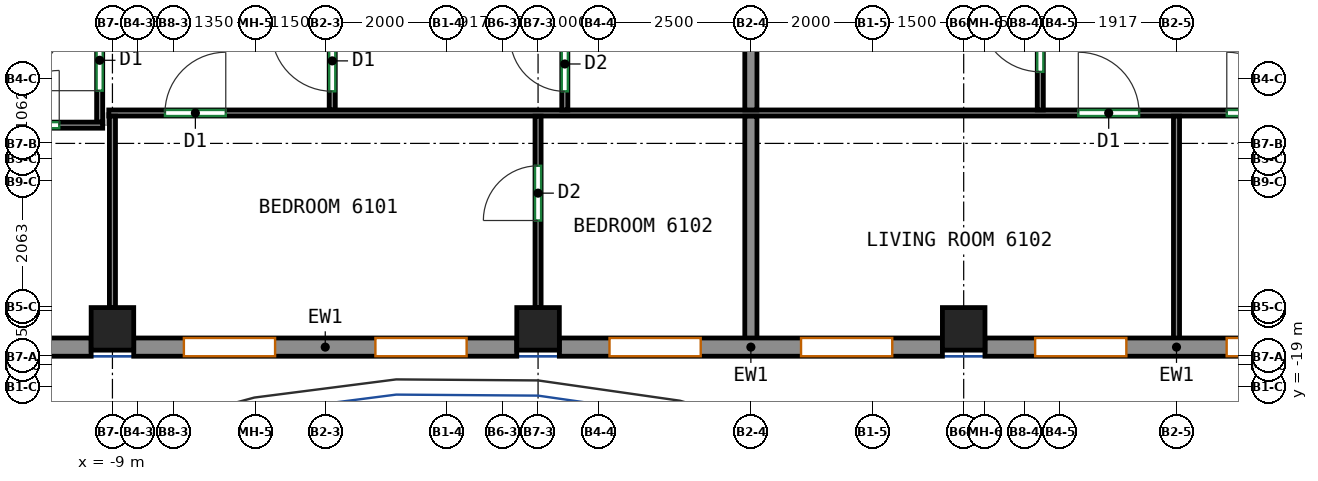
"""IFC4 building model, lengths in metres.
Left out: names, types, materials, properties, quantities, classifications, styles, units other than length and angle.
Written with IfcOpenShell. Run it as: python <this file> out.ifc"""

import sys

from ifc_helpers import new_model, si_unit, direction, frame, frame_2d, origin, origin_2d, place, context, subcontext, project, spatial, rectangle, extrude, source, transform, mapped, element, fill, save


model = new_model("IFC4")
c1 = context("Model", 3, precision=1e-05, world=origin(), true_north=direction((0.0, 1.0)))
c2 = subcontext(c1, "Body", "Model", "MODEL_VIEW")
j1 = project(units=[si_unit("LENGTHUNIT", "METRE"), si_unit("PLANEANGLEUNIT", "RADIAN")], contexts=[c1])
p1 = place(None, origin())
s1 = spatial("IfcSite", under=j1, at=p1, CompositionType="ELEMENT")
p2 = place(p1, origin())
s2 = spatial("IfcBuilding", under=s1, at=p2, CompositionType="ELEMENT")
p3 = place(p2, frame((0.0, 0.0, 252.6)))
s3 = spatial("IfcBuildingStorey", under=s2, at=p3, CompositionType="ELEMENT", Elevation=252.6)
m1 = source(origin(), c2, "Body", "SweptSolid", [
    extrude(rectangle(XDim=0.7, YDim=0.7, at=origin_2d()), origin(), (0.0, 0.0, 1.0), 3.12),
])
for number, where, z_axis, x_axis in (
    (1, (-9.0, -18.05, 0.0), (0.0, 0.0, 1.0), (1.0, 0.0, 0.0)),
    (2, (-2.0, -18.05, 0.0), (0.0, 0.0, 1.0), (1.0, 0.0, 0.0)),
    (3, (5.0, -18.05, 0.0), (0.0, 0.0, 1.0), (1.0, 0.0, 0.0)),
):
    element("IfcColumn", number, at=place(p3, frame(where, z_axis=z_axis, x_axis=x_axis)), inside=s3, PredefinedType="COLUMN", context=c2, shape_type="MappedRepresentation", body=[
        mapped(m1, transform((0.0, 0.0, 0.0))),
    ])
m2 = source(origin(), c2, "Body", "SweptSolid", [
    extrude(rectangle(XDim=6.3, YDim=0.3, at=frame_2d((3.15, 0.0))), origin(), (0.0, 0.0, 1.0), 3.12),
])
p4 = place(p3, frame((-15.65, -18.35, 0.0), z_axis=(0.0, 0.0, 1.0), x_axis=(1.0, 0.0, 0.0)))
e4 = element("IfcWall", 4, at=p4, inside=s3, PredefinedType="SOLIDWALL", context=c2, shape_type="MappedRepresentation", body=[
    mapped(m2, transform((0.0, 0.0, 0.0))),
])
p5 = place(p4, frame((0.825, 0.0, 0.8)))
e5 = element("IfcOpeningElement", 5, at=p5, cuts=e4, PredefinedType="OPENING", context=c2, shape_type="SweptSolid", body=[
    extrude(rectangle(XDim=1.5, YDim=2.05, at=frame_2d((0.75, 1.025))), frame((0.0, 0.16, 0.0), z_axis=(0.0, -1.0, 0.0), x_axis=(1.0, 0.0, 0.0)), (0.0, 0.0, 1.0), 0.32),
])
p6 = place(p4, frame((3.975, 0.0, 0.8)))
e6 = element("IfcOpeningElement", 6, at=p6, cuts=e4, PredefinedType="OPENING", context=c2, shape_type="SweptSolid", body=[
    extrude(rectangle(XDim=1.5, YDim=2.05, at=frame_2d((0.75, 1.025))), frame((0.0, 0.16, 0.0), z_axis=(0.0, -1.0, 0.0), x_axis=(1.0, 0.0, 0.0)), (0.0, 0.0, 1.0), 0.32),
])
p7 = place(p3, frame((-8.65, -18.35, 0.0), z_axis=(0.0, 0.0, 1.0), x_axis=(1.0, 0.0, 0.0)))
e7 = element("IfcWall", 7, at=p7, inside=s3, PredefinedType="SOLIDWALL", context=c2, shape_type="MappedRepresentation", body=[
    mapped(m2, transform((0.0, 0.0, 0.0))),
])
p8 = place(p7, frame((0.825, 0.0, 0.8)))
e8 = element("IfcOpeningElement", 8, at=p8, cuts=e7, PredefinedType="OPENING", context=c2, shape_type="SweptSolid", body=[
    extrude(rectangle(XDim=1.5, YDim=2.05, at=frame_2d((0.75, 1.025))), frame((0.0, 0.16, 0.0), z_axis=(0.0, -1.0, 0.0), x_axis=(1.0, 0.0, 0.0)), (0.0, 0.0, 1.0), 0.32),
])
p9 = place(p7, frame((3.975, 0.0, 0.8)))
e9 = element("IfcOpeningElement", 9, at=p9, cuts=e7, PredefinedType="OPENING", context=c2, shape_type="SweptSolid", body=[
    extrude(rectangle(XDim=1.5, YDim=2.05, at=frame_2d((0.75, 1.025))), frame((0.0, 0.16, 0.0), z_axis=(0.0, -1.0, 0.0), x_axis=(1.0, 0.0, 0.0)), (0.0, 0.0, 1.0), 0.32),
])
p10 = place(p3, frame((-1.65, -18.35, 0.0), z_axis=(0.0, 0.0, 1.0), x_axis=(1.0, 0.0, 0.0)))
e10 = element("IfcWall", 10, at=p10, inside=s3, PredefinedType="SOLIDWALL", context=c2, shape_type="MappedRepresentation", body=[
    mapped(m2, transform((0.0, 0.0, 0.0))),
])
p11 = place(p10, frame((0.825, 0.0, 0.8)))
e11 = element("IfcOpeningElement", 11, at=p11, cuts=e10, PredefinedType="OPENING", context=c2, shape_type="SweptSolid", body=[
    extrude(rectangle(XDim=1.5, YDim=2.05, at=frame_2d((0.75, 1.025))), frame((0.0, 0.16, 0.0), z_axis=(0.0, -1.0, 0.0), x_axis=(1.0, 0.0, 0.0)), (0.0, 0.0, 1.0), 0.32),
])
p12 = place(p10, frame((3.975, 0.0, 0.8)))
e12 = element("IfcOpeningElement", 12, at=p12, cuts=e10, PredefinedType="OPENING", context=c2, shape_type="SweptSolid", body=[
    extrude(rectangle(XDim=1.5, YDim=2.05, at=frame_2d((0.75, 1.025))), frame((0.0, 0.16, 0.0), z_axis=(0.0, -1.0, 0.0), x_axis=(1.0, 0.0, 0.0)), (0.0, 0.0, 1.0), 0.32),
])
p13 = place(p3, frame((5.35, -18.35, 0.0), z_axis=(0.0, 0.0, 1.0), x_axis=(1.0, 0.0, 0.0)))
e13 = element("IfcWall", 13, at=p13, inside=s3, PredefinedType="SOLIDWALL", context=c2, shape_type="MappedRepresentation", body=[
    mapped(m2, transform((0.0, 0.0, 0.0))),
])
p14 = place(p13, frame((0.825, 0.0, 0.8)))
e14 = element("IfcOpeningElement", 14, at=p14, cuts=e13, PredefinedType="OPENING", context=c2, shape_type="SweptSolid", body=[
    extrude(rectangle(XDim=1.5, YDim=2.05, at=frame_2d((0.75, 1.025))), frame((0.0, 0.16, 0.0), z_axis=(0.0, -1.0, 0.0), x_axis=(1.0, 0.0, 0.0)), (0.0, 0.0, 1.0), 0.32),
])
p15 = place(p13, frame((3.975, 0.0, 0.8)))
e15 = element("IfcOpeningElement", 15, at=p15, cuts=e13, PredefinedType="OPENING", context=c2, shape_type="SweptSolid", body=[
    extrude(rectangle(XDim=1.5, YDim=2.05, at=frame_2d((0.75, 1.025))), frame((0.0, 0.16, 0.0), z_axis=(0.0, -1.0, 0.0), x_axis=(1.0, 0.0, 0.0)), (0.0, 0.0, 1.0), 0.32),
])
p16 = place(p3, frame((-9.21, -14.65, 0.0), z_axis=(0.0, 0.0, 1.0), x_axis=(0.0, 1.0, 0.0)))
e16 = element("IfcWall", 16, at=p16, inside=s3, PredefinedType="PARTITIONING", context=c2, shape_type="SweptSolid", body=[
    extrude(rectangle(XDim=2.773, YDim=0.1, at=frame_2d((1.386, 0.0))), origin(), (0.0, 0.0, 1.0), 3.12),
])
p17 = place(p16, frame((0.517, 0.0, 0.0)))
e17 = element("IfcOpeningElement", 17, at=p17, cuts=e16, PredefinedType="OPENING", context=c2, shape_type="SweptSolid", body=[
    extrude(rectangle(XDim=1.0, YDim=2.1, at=frame_2d((0.5, 1.05))), frame((0.0, 0.06, 0.0), z_axis=(0.0, -1.0, 0.0), x_axis=(1.0, 0.0, 0.0)), (0.0, 0.0, 1.0), 0.12),
])
p18 = place(p3, frame((-13.55, -14.7, 0.0), z_axis=(0.0, 0.0, 1.0), x_axis=(1.0, 0.0, 0.0)))
e18 = element("IfcWall", 18, at=p18, inside=s3, PredefinedType="PARTITIONING", context=c2, shape_type="SweptSolid", body=[
    extrude(rectangle(XDim=4.39, YDim=0.1, at=frame_2d((2.195, 0.0))), origin(), (0.0, 0.0, 1.0), 3.12),
])
p19 = place(p18, frame((2.775, 0.0, 0.0)))
e19 = element("IfcOpeningElement", 19, at=p19, cuts=e18, PredefinedType="OPENING", context=c2, shape_type="SweptSolid", body=[
    extrude(rectangle(XDim=0.9, YDim=2.1, at=frame_2d((0.45, 1.05))), frame((0.0, 0.06, 0.0), z_axis=(0.0, -1.0, 0.0), x_axis=(1.0, 0.0, 0.0)), (0.0, 0.0, 1.0), 0.12),
])
p20 = place(p3, frame((-5.385, -14.45, 0.0), z_axis=(0.0, 0.0, 1.0), x_axis=(0.0, 1.0, 0.0)))
e20 = element("IfcWall", 20, at=p20, inside=s3, PredefinedType="PARTITIONING", context=c2, shape_type="SweptSolid", body=[
    extrude(rectangle(XDim=2.573, YDim=0.1, at=frame_2d((1.287, 0.0))), origin(), (0.0, 0.0, 1.0), 3.12),
])
p21 = place(p20, frame((0.307, 0.0, 0.0)))
e21 = element("IfcOpeningElement", 21, at=p21, cuts=e20, PredefinedType="OPENING", context=c2, shape_type="SweptSolid", body=[
    extrude(rectangle(XDim=1.0, YDim=2.1, at=frame_2d((0.5, 1.05))), frame((0.0, 0.06, 0.0), z_axis=(0.0, -1.0, 0.0), x_axis=(1.0, 0.0, 0.0)), (0.0, 0.0, 1.0), 0.12),
])
p22 = place(p3, frame((-9.06, -14.5, 0.0), z_axis=(0.0, 0.0, 1.0), x_axis=(1.0, 0.0, 0.0)))
e22 = element("IfcWall", 22, at=p22, inside=s3, PredefinedType="PARTITIONING", context=c2, shape_type="SweptSolid", body=[
    extrude(rectangle(XDim=24.66, YDim=0.1, at=frame_2d((12.33, 0.0))), origin(), (0.0, 0.0, 1.0), 3.12),
])
p23 = place(p22, frame((0.924, 0.0, 0.0)))
e23 = element("IfcOpeningElement", 23, at=p23, cuts=e22, PredefinedType="OPENING", context=c2, shape_type="SweptSolid", body=[
    extrude(rectangle(XDim=1.0, YDim=2.1, at=frame_2d((0.5, 1.05))), frame((0.0, 0.06, 0.0), z_axis=(0.0, -1.0, 0.0), x_axis=(1.0, 0.0, 0.0)), (0.0, 0.0, 1.0), 0.12),
])
p24 = place(p22, frame((15.945, 0.0, 0.0)))
e24 = element("IfcOpeningElement", 24, at=p24, cuts=e22, PredefinedType="OPENING", context=c2, shape_type="SweptSolid", body=[
    extrude(rectangle(XDim=1.0, YDim=2.1, at=frame_2d((0.5, 1.05))), frame((0.0, 0.06, 0.0), z_axis=(0.0, -1.0, 0.0), x_axis=(1.0, 0.0, 0.0)), (0.0, 0.0, 1.0), 0.12),
])
p25 = place(p22, frame((18.387, 0.0, 0.0)))
e25 = element("IfcOpeningElement", 25, at=p25, cuts=e22, PredefinedType="OPENING", context=c2, shape_type="SweptSolid", body=[
    extrude(rectangle(XDim=1.0, YDim=2.1, at=frame_2d((0.5, 1.05))), frame((0.0, 0.06, 0.0), z_axis=(0.0, -1.0, 0.0), x_axis=(1.0, 0.0, 0.0)), (0.0, 0.0, 1.0), 0.12),
])
p26 = place(p3, frame((-1.56, -14.45, 0.0), z_axis=(0.0, 0.0, 1.0), x_axis=(0.0, 1.0, 0.0)))
e26 = element("IfcWall", 26, at=p26, inside=s3, PredefinedType="PARTITIONING", context=c2, shape_type="SweptSolid", body=[
    extrude(rectangle(XDim=2.573, YDim=0.1, at=frame_2d((1.287, 0.0))), origin(), (0.0, 0.0, 1.0), 3.12),
])
p27 = place(p26, frame((0.306, 0.0, 0.0)))
e27 = element("IfcOpeningElement", 27, at=p27, cuts=e26, PredefinedType="OPENING", context=c2, shape_type="SweptSolid", body=[
    extrude(rectangle(XDim=0.9, YDim=2.1, at=frame_2d((0.45, 1.05))), frame((0.0, 0.06, 0.0), z_axis=(0.0, -1.0, 0.0), x_axis=(1.0, 0.0, 0.0)), (0.0, 0.0, 1.0), 0.12),
])
p28 = place(p3, frame((1.5, -14.45, 0.0), z_axis=(0.0, 0.0, 1.0), x_axis=(0.0, 1.0, 0.0)))
e28 = element("IfcWall", 28, at=p28, inside=s3, PredefinedType="PARTITIONING", context=c2, shape_type="SweptSolid", body=[
    extrude(rectangle(XDim=2.573, YDim=0.2, at=frame_2d((1.287, 0.0))), origin(), (0.0, 0.0, 1.0), 3.12),
])
p29 = place(p3, frame((-9.0, -17.7, 0.0), z_axis=(0.0, 0.0, 1.0), x_axis=(0.0, 1.0, 0.0)))
e29 = element("IfcWall", 29, at=p29, inside=s3, PredefinedType="PARTITIONING", context=c2, shape_type="SweptSolid", body=[
    extrude(rectangle(XDim=3.148, YDim=0.1, at=frame_2d((1.574, 0.0))), origin(), (0.0, 0.0, 1.0), 3.12),
])
p30 = place(p3, frame((-2.0, -17.7, 0.0), z_axis=(0.0, 0.0, 1.0), x_axis=(0.0, 1.0, 0.0)))
e30 = element("IfcWall", 30, at=p30, inside=s3, PredefinedType="PARTITIONING", context=c2, shape_type="SweptSolid", body=[
    extrude(rectangle(XDim=3.148, YDim=0.1, at=frame_2d((1.574, 0.0))), origin(), (0.0, 0.0, 1.0), 3.12),
])
p31 = place(p30, frame((1.432, 0.0, 0.0)))
e31 = element("IfcOpeningElement", 31, at=p31, cuts=e30, PredefinedType="OPENING", context=c2, shape_type="SweptSolid", body=[
    extrude(rectangle(XDim=0.9, YDim=2.1, at=frame_2d((0.45, 1.05))), frame((0.0, 0.06, 0.0), z_axis=(0.0, -1.0, 0.0), x_axis=(1.0, 0.0, 0.0)), (0.0, 0.0, 1.0), 0.12),
])
p32 = place(p3, frame((1.5, -18.25, 0.0), z_axis=(0.0, 0.0, 1.0), x_axis=(0.0, 1.0, 0.0)))
e32 = element("IfcWall", 32, at=p32, inside=s3, PredefinedType="PARTITIONING", context=c2, shape_type="SweptSolid", body=[
    extrude(rectangle(XDim=3.698, YDim=0.2, at=frame_2d((1.849, 0.0))), origin(), (0.0, 0.0, 1.0), 3.12),
])
p33 = place(p3, frame((6.26, -14.45, 0.0), z_axis=(0.0, 0.0, 1.0), x_axis=(0.0, 1.0, 0.0)))
e33 = element("IfcWall", 33, at=p33, inside=s3, PredefinedType="PARTITIONING", context=c2, shape_type="SweptSolid", body=[
    extrude(rectangle(XDim=2.573, YDim=0.1, at=frame_2d((1.287, 0.0))), origin(), (0.0, 0.0, 1.0), 3.12),
])
p34 = place(p33, frame((0.627, 0.0, 0.0)))
e34 = element("IfcOpeningElement", 34, at=p34, cuts=e33, PredefinedType="OPENING", context=c2, shape_type="SweptSolid", body=[
    extrude(rectangle(XDim=1.0, YDim=2.1, at=frame_2d((0.5, 1.05))), frame((0.0, 0.06, 0.0), z_axis=(0.0, -1.0, 0.0), x_axis=(1.0, 0.0, 0.0)), (0.0, 0.0, 1.0), 0.12),
])
p35 = place(p3, frame((8.5, -18.25, 0.0), z_axis=(0.0, 0.0, 1.0), x_axis=(0.0, 1.0, 0.0)))
e35 = element("IfcWall", 35, at=p35, inside=s3, PredefinedType="PARTITIONING", context=c2, shape_type="SweptSolid", body=[
    extrude(rectangle(XDim=3.698, YDim=0.1, at=frame_2d((1.849, 0.0))), origin(), (0.0, 0.0, 1.0), 3.12),
])
p36 = place(p8, origin())
e36 = element("IfcWindow", 36, at=p36, inside=s3, PartitioningType="SINGLE_PANEL", PredefinedType="WINDOW", context=c2, shape_type="SweptSolid", body=[
    extrude(rectangle(XDim=1.5, YDim=2.05, at=frame_2d((0.75, 1.025))), frame((0.0, 0.03, 0.0), z_axis=(0.0, -1.0, 0.0), x_axis=(1.0, 0.0, 0.0)), (0.0, 0.0, 1.0), 0.06),
])
fill(e8, e36)
p37 = place(p9, origin())
e37 = element("IfcWindow", 37, at=p37, inside=s3, PartitioningType="SINGLE_PANEL", PredefinedType="WINDOW", context=c2, shape_type="SweptSolid", body=[
    extrude(rectangle(XDim=1.5, YDim=2.05, at=frame_2d((0.75, 1.025))), frame((0.0, 0.03, 0.0), z_axis=(0.0, -1.0, 0.0), x_axis=(1.0, 0.0, 0.0)), (0.0, 0.0, 1.0), 0.06),
])
fill(e9, e37)
p38 = place(p11, origin())
e38 = element("IfcWindow", 38, at=p38, inside=s3, PartitioningType="SINGLE_PANEL", PredefinedType="WINDOW", context=c2, shape_type="SweptSolid", body=[
    extrude(rectangle(XDim=1.5, YDim=2.05, at=frame_2d((0.75, 1.025))), frame((0.0, 0.03, 0.0), z_axis=(0.0, -1.0, 0.0), x_axis=(1.0, 0.0, 0.0)), (0.0, 0.0, 1.0), 0.06),
])
fill(e11, e38)
p39 = place(p12, origin())
e39 = element("IfcWindow", 39, at=p39, inside=s3, PartitioningType="SINGLE_PANEL", PredefinedType="WINDOW", context=c2, shape_type="SweptSolid", body=[
    extrude(rectangle(XDim=1.5, YDim=2.05, at=frame_2d((0.75, 1.025))), frame((0.0, 0.03, 0.0), z_axis=(0.0, -1.0, 0.0), x_axis=(1.0, 0.0, 0.0)), (0.0, 0.0, 1.0), 0.06),
])
fill(e12, e39)
p40 = place(p14, origin())
e40 = element("IfcWindow", 40, at=p40, inside=s3, PartitioningType="SINGLE_PANEL", PredefinedType="WINDOW", context=c2, shape_type="SweptSolid", body=[
    extrude(rectangle(XDim=1.5, YDim=2.05, at=frame_2d((0.75, 1.025))), frame((0.0, 0.03, 0.0), z_axis=(0.0, -1.0, 0.0), x_axis=(1.0, 0.0, 0.0)), (0.0, 0.0, 1.0), 0.06),
])
fill(e14, e40)
p41 = place(p15, origin())
e41 = element("IfcWindow", 41, at=p41, inside=s3, PartitioningType="SINGLE_PANEL", PredefinedType="WINDOW", context=c2, shape_type="SweptSolid", body=[
    extrude(rectangle(XDim=1.5, YDim=2.05, at=frame_2d((0.75, 1.025))), frame((0.0, 0.03, 0.0), z_axis=(0.0, -1.0, 0.0), x_axis=(1.0, 0.0, 0.0)), (0.0, 0.0, 1.0), 0.06),
])
fill(e15, e41)
p42 = place(p31, origin())
e42 = element("IfcDoor", 42, at=p42, inside=s3, OperationType="SINGLE_SWING_LEFT", PredefinedType="DOOR", context=c2, shape_type="SweptSolid", body=[
    extrude(rectangle(XDim=0.9, YDim=2.1, at=frame_2d((0.45, 1.05))), frame((0.0, 0.025, 0.0), z_axis=(0.0, -1.0, 0.0), x_axis=(1.0, 0.0, 0.0)), (0.0, 0.0, 1.0), 0.05),
])
fill(e31, e42)
p43 = place(p19, origin())
e43 = element("IfcDoor", 43, at=p43, inside=s3, OperationType="SINGLE_SWING_RIGHT", PredefinedType="DOOR", context=c2, shape_type="SweptSolid", body=[
    extrude(rectangle(XDim=0.9, YDim=2.1, at=frame_2d((0.45, 1.05))), frame((0.0, 0.025, 0.0), z_axis=(0.0, -1.0, 0.0), x_axis=(1.0, 0.0, 0.0)), (0.0, 0.0, 1.0), 0.05),
])
fill(e19, e43)
p44 = place(p23, origin())
e44 = element("IfcDoor", 44, at=p44, inside=s3, OperationType="SINGLE_SWING_RIGHT", PredefinedType="DOOR", context=c2, shape_type="SweptSolid", body=[
    extrude(rectangle(XDim=1.0, YDim=2.1, at=frame_2d((0.5, 1.05))), frame((0.0, 0.025, 0.0), z_axis=(0.0, -1.0, 0.0), x_axis=(1.0, 0.0, 0.0)), (0.0, 0.0, 1.0), 0.05),
])
fill(e23, e44)
p45 = place(p24, origin())
e45 = element("IfcDoor", 45, at=p45, inside=s3, OperationType="SINGLE_SWING_LEFT", PredefinedType="DOOR", context=c2, shape_type="SweptSolid", body=[
    extrude(rectangle(XDim=1.0, YDim=2.1, at=frame_2d((0.5, 1.05))), frame((0.0, 0.025, 0.0), z_axis=(0.0, -1.0, 0.0), x_axis=(1.0, 0.0, 0.0)), (0.0, 0.0, 1.0), 0.05),
])
fill(e24, e45)
p46 = place(p25, origin())
e46 = element("IfcDoor", 46, at=p46, inside=s3, OperationType="SINGLE_SWING_LEFT", PredefinedType="DOOR", context=c2, shape_type="SweptSolid", body=[
    extrude(rectangle(XDim=1.0, YDim=2.1, at=frame_2d((0.5, 1.05))), frame((0.0, 0.025, 0.0), z_axis=(0.0, -1.0, 0.0), x_axis=(1.0, 0.0, 0.0)), (0.0, 0.0, 1.0), 0.05),
])
fill(e25, e46)
p47 = place(p27, origin())
e47 = element("IfcDoor", 47, at=p47, inside=s3, OperationType="SINGLE_SWING_RIGHT", PredefinedType="DOOR", context=c2, shape_type="SweptSolid", body=[
    extrude(rectangle(XDim=0.9, YDim=2.1, at=frame_2d((0.45, 1.05))), frame((0.0, 0.025, 0.0), z_axis=(0.0, -1.0, 0.0), x_axis=(1.0, 0.0, 0.0)), (0.0, 0.0, 1.0), 0.05),
])
fill(e27, e47)
p48 = place(p21, origin())
e48 = element("IfcDoor", 48, at=p48, inside=s3, OperationType="SINGLE_SWING_RIGHT", PredefinedType="DOOR", context=c2, shape_type="SweptSolid", body=[
    extrude(rectangle(XDim=1.0, YDim=2.1, at=frame_2d((0.5, 1.05))), frame((0.0, 0.025, 0.0), z_axis=(0.0, -1.0, 0.0), x_axis=(1.0, 0.0, 0.0)), (0.0, 0.0, 1.0), 0.05),
])
fill(e21, e48)
p49 = place(p17, origin())
e49 = element("IfcDoor", 49, at=p49, inside=s3, OperationType="SINGLE_SWING_LEFT", PredefinedType="DOOR", context=c2, shape_type="SweptSolid", body=[
    extrude(rectangle(XDim=1.0, YDim=2.1, at=frame_2d((0.5, 1.05))), frame((0.0, 0.025, 0.0), z_axis=(0.0, -1.0, 0.0), x_axis=(1.0, 0.0, 0.0)), (0.0, 0.0, 1.0), 0.05),
])
fill(e17, e49)
p50 = place(p34, origin())
e50 = element("IfcDoor", 50, at=p50, inside=s3, OperationType="SINGLE_SWING_RIGHT", PredefinedType="DOOR", context=c2, shape_type="SweptSolid", body=[
    extrude(rectangle(XDim=1.0, YDim=2.1, at=frame_2d((0.5, 1.05))), frame((0.0, 0.025, 0.0), z_axis=(0.0, -1.0, 0.0), x_axis=(1.0, 0.0, 0.0)), (0.0, 0.0, 1.0), 0.05),
])
fill(e34, e50)
save(model, sys.argv[1])
